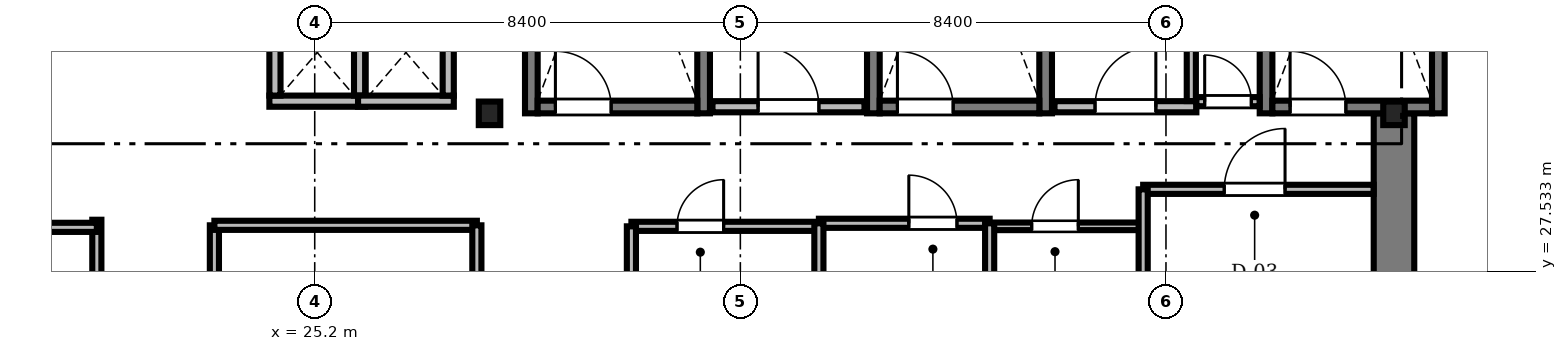
"""IFC4 building model, lengths in metres.
Left out: names, types, materials, properties, quantities, classifications, styles, units other than length and angle.
Written with IfcOpenShell. Run it as: python <this file> out.ifc"""

import sys

from ifc_helpers import new_model, si_unit, direction, frame, frame_2d, origin, origin_2d, place, context, subcontext, project, spatial, rectangle, i_section, extrude, source, transform, mapped, element, fill, save


model = new_model("IFC4")
c1 = context("Model", 3, precision=1e-05, world=origin(), true_north=direction((0.0, 1.0)))
c2 = subcontext(c1, "Body", "Model", "MODEL_VIEW")
j1 = project(units=[si_unit("LENGTHUNIT", "METRE"), si_unit("PLANEANGLEUNIT", "RADIAN")], contexts=[c1])
p1 = place(None, origin())
s1 = spatial("IfcSite", under=j1, at=p1, CompositionType="ELEMENT")
p2 = place(p1, origin())
s2 = spatial("IfcBuilding", under=s1, at=p2, CompositionType="ELEMENT")
p3 = place(p2, frame((0.0, 0.0, 137.2)))
s3 = spatial("IfcBuildingStorey", under=s2, at=p3, CompositionType="ELEMENT", Elevation=137.2)
m1 = source(origin(), c2, "Body", "SweptSolid", [
    extrude(rectangle(XDim=13.15, YDim=0.8, at=frame_2d((6.575, 0.0))), origin(), (0.0, 0.0, 1.0), 3.46),
])
p4 = place(p3, frame((46.5, 17.5, 0.0), z_axis=(0.0, 0.0, 1.0), x_axis=(0.0, 1.0, 0.0)))
e1 = element("IfcWall", 1, at=p4, inside=s3, PredefinedType="SHEAR", context=c2, shape_type="MappedRepresentation", body=[
    mapped(m1, transform((0.0, 0.0, 0.0), scale=1.0)),
])
m2 = source(origin(), c2, "Body", "SweptSolid", [
    extrude(i_section(OverallWidth=0.424, OverallDepth=0.465, WebThickness=0.035, FlangeThickness=0.056, FilletRadius=0.015, at=origin_2d()), origin(), (0.0, 0.0, 1.0), 3.46),
])
for number, where, z_axis, x_axis in (
    (2, (28.65, 30.65, 0.0), (0.0, 0.0, 1.0), (1.0, 0.0, 0.0)),
    (3, (46.5, 30.65, 0.0), (0.0, 0.0, 1.0), (1.0, 0.0, 0.0)),
):
    element("IfcColumn", number, at=place(p3, frame(where, z_axis=z_axis, x_axis=x_axis)), inside=s3, PredefinedType="COLUMN", context=c2, shape_type="MappedRepresentation", body=[
        mapped(m2, transform((0.0, 0.0, 0.0), scale=1.0)),
    ])
m3 = source(origin(), c2, "Body", "SweptSolid", [
    extrude(rectangle(XDim=9.25, YDim=0.25, at=frame_2d((4.625, 0.0))), origin(), (0.0, 0.0, 1.0), 3.5),
])
for number, where, z_axis, x_axis in (
    (4, (29.475, 30.65, 0.0), (0.0, 0.0, 1.0), (0.0, 1.0, 0.0)),
    (5, (32.875, 30.65, 0.0), (0.0, 0.0, 1.0), (0.0, 1.0, 0.0)),
):
    element("IfcWall", number, at=place(p3, frame(where, z_axis=z_axis, x_axis=x_axis)), inside=s3, PredefinedType="SOLIDWALL", context=c2, shape_type="MappedRepresentation", body=[
        mapped(m3, transform((0.0, 0.0, 0.0), scale=1.0)),
    ])
m4 = source(origin(), c2, "Body", "SweptSolid", [
    extrude(rectangle(XDim=3.15, YDim=0.25, at=frame_2d((1.575, 0.0))), origin(), (0.0, 0.0, 1.0), 3.5),
])
p5 = place(p3, frame((29.6, 30.775, 0.0), z_axis=(0.0, 0.0, 1.0), x_axis=(1.0, 0.0, 0.0)))
e6 = element("IfcWall", 6, at=p5, inside=s3, PredefinedType="SOLIDWALL", context=c2, shape_type="MappedRepresentation", body=[
    mapped(m4, transform((0.0, 0.0, 0.0), scale=1.0)),
])
m5 = source(origin(), c2, "Body", "SweptSolid", [
    extrude(rectangle(XDim=1.1, YDim=2.2, at=frame_2d((0.55, 1.1))), frame((0.0, 0.135, 0.0), z_axis=(0.0, -1.0, 0.0), x_axis=(1.0, 0.0, 0.0)), (0.0, 0.0, 1.0), 0.27),
])
p6 = place(p5, frame((0.35, 0.0, 0.0)))
e7 = element("IfcOpeningElement", 7, at=p6, cuts=e6, PredefinedType="OPENING", context=c2, shape_type="MappedRepresentation", body=[
    mapped(m5, transform((0.0, 0.0, 0.0), scale=1.0)),
])
for number, where, z_axis, x_axis in (
    (8, (36.225, 30.65, 0.0), (0.0, 0.0, 1.0), (0.0, 1.0, 0.0)),
    (9, (39.625, 30.65, 0.0), (0.0, 0.0, 1.0), (0.0, 1.0, 0.0)),
):
    element("IfcWall", number, at=place(p3, frame(where, z_axis=z_axis, x_axis=x_axis)), inside=s3, PredefinedType="SOLIDWALL", context=c2, shape_type="MappedRepresentation", body=[
        mapped(m3, transform((0.0, 0.0, 0.0), scale=1.0)),
    ])
p7 = place(p3, frame((36.35, 30.775, 0.0), z_axis=(0.0, 0.0, 1.0), x_axis=(1.0, 0.0, 0.0)))
e10 = element("IfcWall", 10, at=p7, inside=s3, PredefinedType="SOLIDWALL", context=c2, shape_type="MappedRepresentation", body=[
    mapped(m4, transform((0.0, 0.0, 0.0), scale=1.0)),
])
p8 = place(p7, frame((0.35, 0.0, 0.0)))
e11 = element("IfcOpeningElement", 11, at=p8, cuts=e10, PredefinedType="OPENING", context=c2, shape_type="MappedRepresentation", body=[
    mapped(m5, transform((0.0, 0.0, 0.0), scale=1.0)),
])
for number, where, z_axis, x_axis in (
    (12, (43.975, 30.65, 0.0), (0.0, 0.0, 1.0), (0.0, 1.0, 0.0)),
    (13, (47.375, 30.65, 0.0), (0.0, 0.0, 1.0), (0.0, 1.0, 0.0)),
):
    element("IfcWall", number, at=place(p3, frame(where, z_axis=z_axis, x_axis=x_axis)), inside=s3, PredefinedType="SOLIDWALL", context=c2, shape_type="MappedRepresentation", body=[
        mapped(m3, transform((0.0, 0.0, 0.0), scale=1.0)),
    ])
p9 = place(p3, frame((44.1, 30.775, 0.0), z_axis=(0.0, 0.0, 1.0), x_axis=(1.0, 0.0, 0.0)))
e14 = element("IfcWall", 14, at=p9, inside=s3, PredefinedType="SOLIDWALL", context=c2, shape_type="MappedRepresentation", body=[
    mapped(m4, transform((0.0, 0.0, 0.0), scale=1.0)),
])
p10 = place(p9, frame((0.35, 0.0, 0.0)))
e15 = element("IfcOpeningElement", 15, at=p10, cuts=e14, PredefinedType="OPENING", context=c2, shape_type="MappedRepresentation", body=[
    mapped(m5, transform((0.0, 0.0, 0.0), scale=1.0)),
])
m6 = source(origin(), c2, "Body", "SweptSolid", [
    extrude(rectangle(XDim=3.0, YDim=0.22, at=frame_2d((1.5, 0.0))), origin(), (0.0, 0.0, 1.0), 3.46),
])
p11 = place(p3, frame((33.05, 30.78, 0.0), z_axis=(0.0, 0.0, 1.0), x_axis=(1.0, 0.0, 0.0)))
e16 = element("IfcWall", 16, at=p11, inside=s3, PredefinedType="SOLIDWALL", context=c2, shape_type="MappedRepresentation", body=[
    mapped(m6, transform((0.0, 0.0, 0.0), scale=1.0)),
])
m7 = source(origin(), c2, "Body", "SweptSolid", [
    extrude(rectangle(XDim=1.2, YDim=2.2, at=frame_2d((0.6, 1.1))), frame((0.0, 0.12, 0.0), z_axis=(0.0, -1.0, 0.0), x_axis=(1.0, 0.0, 0.0)), (0.0, 0.0, 1.0), 0.24),
])
p12 = place(p11, frame((0.9, 0.0, 0.0)))
e17 = element("IfcOpeningElement", 17, at=p12, cuts=e16, PredefinedType="OPENING", context=c2, shape_type="MappedRepresentation", body=[
    mapped(m7, transform((0.0, 0.0, 0.0), scale=1.0)),
])
m8 = source(origin(), c2, "Body", "SweptSolid", [
    extrude(rectangle(XDim=2.8, YDim=0.22, at=frame_2d((1.4, 0.0))), origin(), (0.0, 0.0, 1.0), 3.46),
])
p13 = place(p3, frame((39.8, 30.78, 0.0), z_axis=(0.0, 0.0, 1.0), x_axis=(1.0, 0.0, 0.0)))
e18 = element("IfcWall", 18, at=p13, inside=s3, PredefinedType="SOLIDWALL", context=c2, shape_type="MappedRepresentation", body=[
    mapped(m8, transform((0.0, 0.0, 0.0), scale=1.0)),
])
p14 = place(p13, frame((0.8, 0.0, 0.0)))
e19 = element("IfcOpeningElement", 19, at=p14, cuts=e18, PredefinedType="OPENING", context=c2, shape_type="MappedRepresentation", body=[
    mapped(m7, transform((0.0, 0.0, 0.0), scale=1.0)),
])
m9 = source(origin(), c2, "Body", "SweptSolid", [
    extrude(rectangle(XDim=1.89, YDim=0.22, at=frame_2d((0.945, 0.0))), origin(), (0.0, 0.0, 1.0), 3.46),
])
p15 = place(p3, frame((24.305, 30.89, 0.0), z_axis=(0.0, 0.0, 1.0), x_axis=(1.0, 0.0, 0.0)))
e20 = element("IfcWall", 20, at=p15, inside=s3, PredefinedType="SOLIDWALL", context=c2, shape_type="MappedRepresentation", body=[
    mapped(m9, transform((0.0, 0.0, 0.0), scale=1.0)),
])
m10 = source(origin(), c2, "Body", "SweptSolid", [
    extrude(rectangle(XDim=1.7, YDim=0.22, at=frame_2d((0.85, 0.0))), origin(), (0.0, 0.0, 1.0), 3.46),
])
for number, where, z_axis, x_axis in (
    (21, (24.415, 31.0, 0.0), (0.0, 0.0, 1.0), (0.0, 1.0, 0.0)),
    (22, (26.085, 31.0, 0.0), (0.0, 0.0, 1.0), (0.0, 1.0, 0.0)),
):
    element("IfcWall", number, at=place(p3, frame(where, z_axis=z_axis, x_axis=x_axis)), inside=s3, PredefinedType="SOLIDWALL", context=c2, shape_type="MappedRepresentation", body=[
        mapped(m10, transform((0.0, 0.0, 0.0), scale=1.0)),
    ])
p16 = place(p3, frame((26.055, 30.89, 0.0), z_axis=(0.0, 0.0, 1.0), x_axis=(1.0, 0.0, 0.0)))
e23 = element("IfcWall", 23, at=p16, inside=s3, PredefinedType="SOLIDWALL", context=c2, shape_type="MappedRepresentation", body=[
    mapped(m9, transform((0.0, 0.0, 0.0), scale=1.0)),
])
p17 = place(p3, frame((27.835, 31.0, 0.0), z_axis=(0.0, 0.0, 1.0), x_axis=(0.0, 1.0, 0.0)))
e24 = element("IfcWall", 24, at=p17, inside=s3, PredefinedType="SOLIDWALL", context=c2, shape_type="MappedRepresentation", body=[
    mapped(m10, transform((0.0, 0.0, 0.0), scale=1.0)),
])
m11 = source(origin(), c2, "Body", "SweptSolid", [
    extrude(rectangle(XDim=14.15, YDim=0.18, at=frame_2d((7.075, 0.0))), origin(), (0.0, 0.0, 1.0), 2.852),
])
p18 = place(p3, frame((20.9, 14.4, 0.0), z_axis=(0.0, 0.0, 1.0), x_axis=(0.0, 1.0, 0.0)))
e25 = element("IfcWall", 25, at=p18, inside=s3, PredefinedType="PARTITIONING", context=c2, shape_type="MappedRepresentation", body=[
    mapped(m11, transform((0.0, 0.0, 0.0), scale=1.0)),
])
m12 = source(origin(), c2, "Body", "SweptSolid", [
    extrude(rectangle(XDim=1.05, YDim=2.2, at=frame_2d((0.525, 1.1))), frame((0.0, 0.1, 0.0), z_axis=(0.0, -1.0, 0.0), x_axis=(1.0, 0.0, 0.0)), (0.0, 0.0, 1.0), 0.2),
])
p19 = place(p18, frame((1.813, 0.0, 0.0)))
e26 = element("IfcOpeningElement", 26, at=p19, cuts=e25, PredefinedType="OPENING", context=c2, shape_type="MappedRepresentation", body=[
    mapped(m12, transform((0.0, 0.0, 0.0), scale=1.0)),
])
m13 = source(origin(), c2, "Body", "SweptSolid", [
    extrude(rectangle(XDim=0.95, YDim=2.15, at=frame_2d((0.475, 1.075))), frame((0.0, 0.1, 0.0), z_axis=(0.0, -1.0, 0.0), x_axis=(1.0, 0.0, 0.0)), (0.0, 0.0, 1.0), 0.2),
])
p20 = place(p18, frame((7.705, 0.0, 0.0)))
e27 = element("IfcOpeningElement", 27, at=p20, cuts=e25, PredefinedType="OPENING", context=c2, shape_type="MappedRepresentation", body=[
    mapped(m13, transform((0.0, 0.0, 0.0), scale=1.0)),
])
p21 = place(p18, frame((11.146, 0.0, 0.0)))
e28 = element("IfcOpeningElement", 28, at=p21, cuts=e25, PredefinedType="OPENING", context=c2, shape_type="MappedRepresentation", body=[
    mapped(m12, transform((0.0, 0.0, 0.0), scale=1.0)),
])
m14 = source(origin(), c2, "Body", "SweptSolid", [
    extrude(rectangle(XDim=4.548, YDim=0.18, at=frame_2d((2.274, 0.0))), origin(), (0.0, 0.0, 1.0), 3.092),
])
p22 = place(p3, frame((41.55, 29.15, 0.0), z_axis=(0.0, 0.0, 1.0), x_axis=(1.0, 0.0, 0.0)))
e29 = element("IfcWall", 29, at=p22, inside=s3, PredefinedType="PARTITIONING", context=c2, shape_type="MappedRepresentation", body=[
    mapped(m14, transform((0.0, 0.0, 0.0), scale=1.0)),
])
m15 = source(origin(), c2, "Body", "SweptSolid", [
    extrude(rectangle(XDim=1.2, YDim=2.2, at=frame_2d((0.6, 1.1))), frame((0.0, 0.1, 0.0), z_axis=(0.0, -1.0, 0.0), x_axis=(1.0, 0.0, 0.0)), (0.0, 0.0, 1.0), 0.2),
])
p23 = place(p22, frame((1.6, 0.0, 0.0)))
e30 = element("IfcOpeningElement", 30, at=p23, cuts=e29, PredefinedType="OPENING", context=c2, shape_type="MappedRepresentation", body=[
    mapped(m15, transform((0.0, 0.0, 0.0), scale=1.0)),
])
m16 = source(origin(), c2, "Body", "SweptSolid", [
    extrude(rectangle(XDim=4.24, YDim=0.18, at=frame_2d((2.12, 0.0))), origin(), (0.0, 0.0, 1.0), 2.852),
])
p24 = place(p3, frame((23.22, 24.2, 0.0), z_axis=(0.0, 0.0, 1.0), x_axis=(0.0, 1.0, 0.0)))
e31 = element("IfcWall", 31, at=p24, inside=s3, PredefinedType="PARTITIONING", context=c2, shape_type="MappedRepresentation", body=[
    mapped(m16, transform((0.0, 0.0, 0.0), scale=1.0)),
])
p25 = place(p24, frame((1.4, 0.0, 0.0)))
e32 = element("IfcOpeningElement", 32, at=p25, cuts=e31, PredefinedType="OPENING", context=c2, shape_type="MappedRepresentation", body=[
    mapped(m12, transform((0.0, 0.0, 0.0), scale=1.0)),
])
m17 = source(origin(), c2, "Body", "SweptSolid", [
    extrude(rectangle(XDim=3.7, YDim=0.18, at=frame_2d((1.85, 0.0))), origin(), (0.0, 0.0, 1.0), 3.092),
])
p26 = place(p3, frame((31.45, 28.42, 0.0), z_axis=(0.0, 0.0, 1.0), x_axis=(1.0, 0.0, 0.0)))
e33 = element("IfcWall", 33, at=p26, inside=s3, PredefinedType="PARTITIONING", context=c2, shape_type="MappedRepresentation", body=[
    mapped(m17, transform((0.0, 0.0, 0.0), scale=1.0)),
])
m18 = source(origin(), c2, "Body", "SweptSolid", [
    extrude(rectangle(XDim=0.92, YDim=2.1, at=frame_2d((0.46, 1.05))), frame((0.0, 0.1, 0.0), z_axis=(0.0, -1.0, 0.0), x_axis=(1.0, 0.0, 0.0)), (0.0, 0.0, 1.0), 0.2),
])
p27 = place(p26, frame((0.9, 0.0, 0.0)))
e34 = element("IfcOpeningElement", 34, at=p27, cuts=e33, PredefinedType="OPENING", context=c2, shape_type="MappedRepresentation", body=[
    mapped(m18, transform((0.0, 0.0, 0.0), scale=1.0)),
])
m19 = source(origin(), c2, "Body", "SweptSolid", [
    extrude(rectangle(XDim=3.37, YDim=0.18, at=frame_2d((1.685, 0.0))), origin(), (0.0, 0.0, 1.0), 3.46),
])
p28 = place(p3, frame((35.15, 28.48, 0.0), z_axis=(0.0, 0.0, 1.0), x_axis=(1.0, 0.0, 0.0)))
e35 = element("IfcWall", 35, at=p28, inside=s3, PredefinedType="PARTITIONING", context=c2, shape_type="MappedRepresentation", body=[
    mapped(m19, transform((0.0, 0.0, 0.0), scale=1.0)),
])
p29 = place(p28, frame((1.775, 0.0, 0.0)))
e36 = element("IfcOpeningElement", 36, at=p29, cuts=e35, PredefinedType="OPENING", context=c2, shape_type="MappedRepresentation", body=[
    mapped(m13, transform((0.0, 0.0, 0.0), scale=1.0)),
])
m20 = source(origin(), c2, "Body", "SweptSolid", [
    extrude(rectangle(XDim=3.0, YDim=0.15, at=frame_2d((1.5, 0.0))), origin(), (0.0, 0.0, 1.0), 3.46),
])
p30 = place(p3, frame((38.52, 28.42, 0.0), z_axis=(0.0, 0.0, 1.0), x_axis=(1.0, 0.0, 0.0)))
e37 = element("IfcWall", 37, at=p30, inside=s3, PredefinedType="PARTITIONING", context=c2, shape_type="MappedRepresentation", body=[
    mapped(m20, transform((0.0, 0.0, 0.0), scale=1.0)),
])
m21 = source(origin(), c2, "Body", "SweptSolid", [
    extrude(rectangle(XDim=0.92, YDim=2.1, at=frame_2d((0.46, 1.05))), frame((0.0, 0.085, 0.0), z_axis=(0.0, -1.0, 0.0), x_axis=(1.0, 0.0, 0.0)), (0.0, 0.0, 1.0), 0.17),
])
p31 = place(p30, frame((0.83, 0.0, 0.0)))
e38 = element("IfcOpeningElement", 38, at=p31, cuts=e37, PredefinedType="OPENING", context=c2, shape_type="MappedRepresentation", body=[
    mapped(m21, transform((0.0, 0.0, 0.0), scale=1.0)),
])
m22 = source(origin(), c2, "Body", "SweptSolid", [
    extrude(rectangle(XDim=1.248, YDim=0.18, at=frame_2d((0.624, 0.0))), origin(), (0.0, 0.0, 1.0), 3.46),
])
p32 = place(p3, frame((42.6, 30.88, 0.0), z_axis=(0.0, 0.0, 1.0), x_axis=(1.0, 0.0, 0.0)))
e39 = element("IfcWall", 39, at=p32, inside=s3, PredefinedType="PARTITIONING", context=c2, shape_type="MappedRepresentation", body=[
    mapped(m22, transform((0.0, 0.0, 0.0), scale=1.0)),
])
p33 = place(p32, frame((0.164, 0.0, 0.0)))
e40 = element("IfcOpeningElement", 40, at=p33, cuts=e39, PredefinedType="OPENING", context=c2, shape_type="MappedRepresentation", body=[
    mapped(m18, transform((0.0, 0.0, 0.0), scale=1.0)),
])
m23 = source(origin(), c2, "Body", "SweptSolid", [
    extrude(rectangle(XDim=14.17, YDim=0.18, at=frame_2d((7.085, 0.0))), origin(), (0.0, 0.0, 1.0), 2.702),
])
p34 = place(p3, frame((6.73, 28.4, 0.0), z_axis=(0.0, 0.0, 1.0), x_axis=(1.0, 0.0, 0.0)))
e41 = element("IfcWall", 41, at=p34, inside=s3, PredefinedType="PARTITIONING", context=c2, shape_type="MappedRepresentation", body=[
    mapped(m23, transform((0.0, 0.0, 0.0), scale=1.0)),
])
m24 = source(origin(), c2, "Body", "SweptSolid", [
    extrude(rectangle(XDim=5.18, YDim=0.18, at=frame_2d((2.59, 0.0))), origin(), (0.0, 0.0, 1.0), 3.46),
])
p35 = place(p3, frame((23.22, 28.44, 0.0), z_axis=(0.0, 0.0, 1.0), x_axis=(1.0, 0.0, 0.0)))
e42 = element("IfcWall", 42, at=p35, inside=s3, PredefinedType="PARTITIONING", context=c2, shape_type="MappedRepresentation", body=[
    mapped(m24, transform((0.0, 0.0, 0.0), scale=1.0)),
])
p36 = place(p3, frame((28.4, 24.2, 0.0), z_axis=(0.0, 0.0, 1.0), x_axis=(0.0, 1.0, 0.0)))
e43 = element("IfcWall", 43, at=p36, inside=s3, PredefinedType="PARTITIONING", context=c2, shape_type="MappedRepresentation", body=[
    mapped(m16, transform((0.0, 0.0, 0.0), scale=1.0)),
])
m25 = source(origin(), c2, "Body", "SweptSolid", [
    extrude(rectangle(XDim=2.35, YDim=0.18, at=frame_2d((1.175, 0.0))), origin(), (0.0, 0.0, 1.0), 2.852),
])
p37 = place(p3, frame((41.55, 26.8, 0.0), z_axis=(0.0, 0.0, 1.0), x_axis=(0.0, 1.0, 0.0)))
e44 = element("IfcWall", 44, at=p37, inside=s3, PredefinedType="PARTITIONING", context=c2, shape_type="MappedRepresentation", body=[
    mapped(m25, transform((0.0, 0.0, 0.0), scale=1.0)),
])
m26 = source(origin(), c2, "Body", "SweptSolid", [
    extrude(rectangle(XDim=1.858, YDim=0.18, at=frame_2d((0.929, 0.0))), origin(), (0.0, 0.0, 1.0), 3.46),
])
p38 = place(p3, frame((42.5, 30.892, 0.0), z_axis=(0.0, 0.0, 1.0), x_axis=(0.0, 1.0, 0.0)))
e45 = element("IfcWall", 45, at=p38, inside=s3, PredefinedType="PARTITIONING", context=c2, shape_type="MappedRepresentation", body=[
    mapped(m26, transform((0.0, 0.0, 0.0), scale=1.0)),
])
m27 = source(origin(), c2, "Body", "SweptSolid", [
    extrude(rectangle(XDim=1.66, YDim=0.18, at=frame_2d((0.83, 0.0))), origin(), (0.0, 0.0, 1.0), 3.002),
])
for number, where, z_axis, x_axis in (
    (46, (35.15, 26.82, 0.0), (0.0, 0.0, 1.0), (0.0, 1.0, 0.0)),
    (47, (38.52, 26.82, 0.0), (0.0, 0.0, 1.0), (0.0, 1.0, 0.0)),
):
    element("IfcWall", number, at=place(p3, frame(where, z_axis=z_axis, x_axis=x_axis)), inside=s3, PredefinedType="PARTITIONING", context=c2, shape_type="MappedRepresentation", body=[
        mapped(m27, transform((0.0, 0.0, 0.0), scale=1.0)),
    ])
m28 = source(origin(), c2, "Body", "SweptSolid", [
    extrude(rectangle(XDim=1.6, YDim=0.18, at=frame_2d((0.8, 0.0))), origin(), (0.0, 0.0, 1.0), 3.002),
])
p39 = place(p3, frame((31.45, 26.82, 0.0), z_axis=(0.0, 0.0, 1.0), x_axis=(0.0, 1.0, 0.0)))
e48 = element("IfcWall", 48, at=p39, inside=s3, PredefinedType="PARTITIONING", context=c2, shape_type="MappedRepresentation", body=[
    mapped(m28, transform((0.0, 0.0, 0.0), scale=1.0)),
])
m29 = source(origin(), c2, "Body", "SweptSolid", [
    extrude(rectangle(XDim=1.1, YDim=2.2, at=frame_2d((0.55, 1.1))), frame((0.0, 0.025, 0.0), z_axis=(0.0, -1.0, 0.0), x_axis=(1.0, 0.0, 0.0)), (0.0, 0.0, 1.0), 0.05),
])
p40 = place(p6, origin())
e49 = element("IfcDoor", 49, at=p40, inside=s3, OperationType="SINGLE_SWING_LEFT", PredefinedType="DOOR", context=c2, shape_type="MappedRepresentation", body=[
    mapped(m29, transform((0.0, 0.0, 0.0), scale=1.0)),
])
fill(e7, e49)
p41 = place(p8, origin())
e50 = element("IfcDoor", 50, at=p41, inside=s3, OperationType="SINGLE_SWING_LEFT", PredefinedType="DOOR", context=c2, shape_type="MappedRepresentation", body=[
    mapped(m29, transform((0.0, 0.0, 0.0), scale=1.0)),
])
fill(e11, e50)
p42 = place(p10, origin())
e51 = element("IfcDoor", 51, at=p42, inside=s3, OperationType="SINGLE_SWING_LEFT", PredefinedType="DOOR", context=c2, shape_type="MappedRepresentation", body=[
    mapped(m29, transform((0.0, 0.0, 0.0), scale=1.0)),
])
fill(e15, e51)
m30 = source(origin(), c2, "Body", "SweptSolid", [
    extrude(rectangle(XDim=1.2, YDim=2.2, at=frame_2d((0.6, 1.1))), frame((0.0, 0.025, 0.0), z_axis=(0.0, -1.0, 0.0), x_axis=(1.0, 0.0, 0.0)), (0.0, 0.0, 1.0), 0.05),
])
p43 = place(p12, origin())
e52 = element("IfcDoor", 52, at=p43, inside=s3, OperationType="SINGLE_SWING_LEFT", PredefinedType="DOOR", context=c2, shape_type="MappedRepresentation", body=[
    mapped(m30, transform((0.0, 0.0, 0.0), scale=1.0)),
])
fill(e17, e52)
p44 = place(p14, origin())
e53 = element("IfcDoor", 53, at=p44, inside=s3, OperationType="SINGLE_SWING_RIGHT", PredefinedType="DOOR", context=c2, shape_type="MappedRepresentation", body=[
    mapped(m30, transform((0.0, 0.0, 0.0), scale=1.0)),
])
fill(e19, e53)
p45 = place(p23, origin())
e54 = element("IfcDoor", 54, at=p45, inside=s3, OperationType="SINGLE_SWING_RIGHT", PredefinedType="DOOR", context=c2, shape_type="MappedRepresentation", body=[
    mapped(m30, transform((0.0, 0.0, 0.0), scale=1.0)),
])
fill(e30, e54)
m31 = source(origin(), c2, "Body", "SweptSolid", [
    extrude(rectangle(XDim=0.92, YDim=2.1, at=frame_2d((0.46, 1.05))), frame((0.0, 0.025, 0.0), z_axis=(0.0, -1.0, 0.0), x_axis=(1.0, 0.0, 0.0)), (0.0, 0.0, 1.0), 0.05),
])
p46 = place(p27, origin())
e55 = element("IfcDoor", 55, at=p46, inside=s3, OperationType="SINGLE_SWING_RIGHT", PredefinedType="DOOR", context=c2, shape_type="MappedRepresentation", body=[
    mapped(m31, transform((0.0, 0.0, 0.0), scale=1.0)),
])
fill(e34, e55)
m32 = source(origin(), c2, "Body", "SweptSolid", [
    extrude(rectangle(XDim=0.95, YDim=2.15, at=frame_2d((0.475, 1.075))), frame((0.0, 0.025, 0.0), z_axis=(0.0, -1.0, 0.0), x_axis=(1.0, 0.0, 0.0)), (0.0, 0.0, 1.0), 0.05),
])
p47 = place(p29, origin())
e56 = element("IfcDoor", 56, at=p47, inside=s3, OperationType="SINGLE_SWING_LEFT", PredefinedType="DOOR", context=c2, shape_type="MappedRepresentation", body=[
    mapped(m32, transform((0.0, 0.0, 0.0), scale=1.0)),
])
fill(e36, e56)
p48 = place(p31, origin())
e57 = element("IfcDoor", 57, at=p48, inside=s3, OperationType="SINGLE_SWING_RIGHT", PredefinedType="DOOR", context=c2, shape_type="MappedRepresentation", body=[
    mapped(m31, transform((0.0, 0.0, 0.0), scale=1.0)),
])
fill(e38, e57)
p49 = place(p33, origin())
e58 = element("IfcDoor", 58, at=p49, inside=s3, OperationType="SINGLE_SWING_LEFT", PredefinedType="DOOR", context=c2, shape_type="MappedRepresentation", body=[
    mapped(m31, transform((0.0, 0.0, 0.0), scale=1.0)),
])
fill(e40, e58)
save(model, sys.argv[1])
